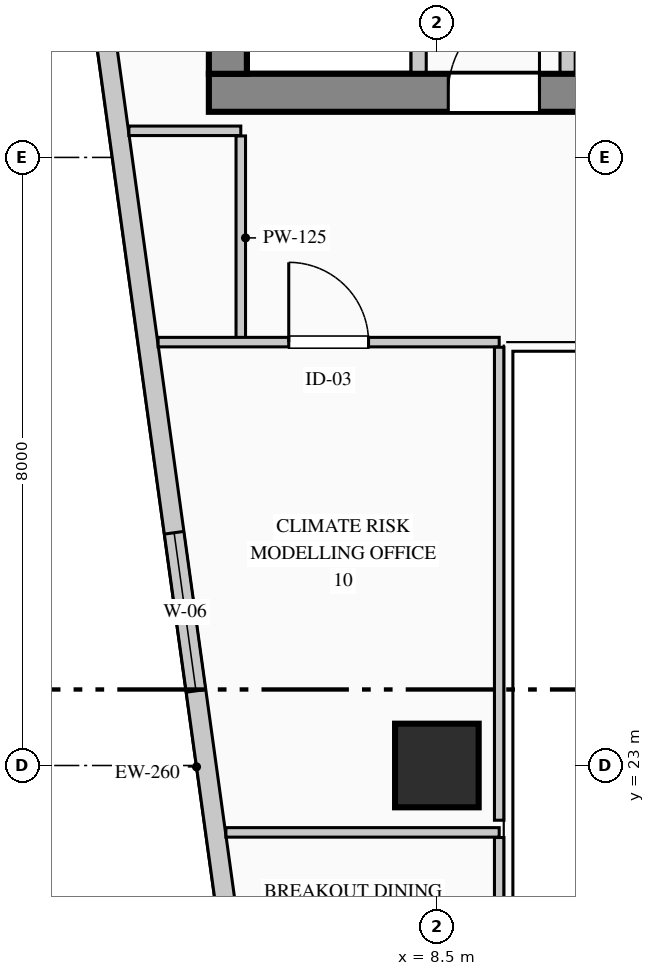
"""IFC4 building model, lengths in metres.
Left out: names, types, materials, properties, quantities, classifications, styles, units other than length and angle.
Written with IfcOpenShell. Run it as: python <this file> out.ifc"""

import sys

from ifc_helpers import new_model, si_unit, direction, frame, frame_2d, origin, origin_2d, place, context, subcontext, project, spatial, rectangle, extrude, element, fill, save


model = new_model("IFC4")
c1 = context("Model", 3, precision=1e-05, world=origin(), true_north=direction((0.0, 1.0)))
c2 = subcontext(c1, "Body", "Model", "MODEL_VIEW")
j1 = project(units=[si_unit("LENGTHUNIT", "METRE"), si_unit("PLANEANGLEUNIT", "RADIAN")], contexts=[c1])
p1 = place(None, origin())
s1 = spatial("IfcSite", under=j1, at=p1, CompositionType="ELEMENT")
p2 = place(p1, origin())
s2 = spatial("IfcBuilding", under=s1, at=p2, CompositionType="ELEMENT")
p3 = place(p2, frame((0.0, 0.0, 146.95)))
s3 = spatial("IfcBuildingStorey", under=s2, at=p3, CompositionType="ELEMENT", Elevation=146.95)
p4 = place(p3, frame((5.5, 31.85, 0.0), z_axis=(0.0, 0.0, 1.0), x_axis=(1.0, 0.0, 0.0)))
e1 = element("IfcWall", 1, at=p4, inside=s3, PredefinedType="SHEAR", context=c2, shape_type="SweptSolid", body=[
    extrude(rectangle(XDim=17.85, YDim=0.5, at=frame_2d((8.925, 0.0))), origin(), (0.0, 0.0, 1.0), 3.95),
])
p5 = place(p4, frame((3.15, 0.0, 0.0)))
e2 = element("IfcOpeningElement", 2, at=p5, cuts=e1, PredefinedType="OPENING", context=c2, shape_type="SweptSolid", body=[
    extrude(rectangle(XDim=1.2, YDim=2.2, at=frame_2d((0.6, 1.1))), frame((0.0, 0.26, 0.0), z_axis=(0.0, -1.0, 0.0), x_axis=(1.0, 0.0, 0.0)), (0.0, 0.0, 1.0), 0.52),
])
p6 = place(p4, frame((7.0, 0.0, 0.0)))
e3 = element("IfcOpeningElement", 3, at=p6, cuts=e1, PredefinedType="OPENING", context=c2, shape_type="SweptSolid", body=[
    extrude(rectangle(XDim=1.2, YDim=2.2, at=frame_2d((0.6, 1.1))), frame((0.0, 0.26, 0.0), z_axis=(0.0, -1.0, 0.0), x_axis=(1.0, 0.0, 0.0)), (0.0, 0.0, 1.0), 0.52),
])
p7 = place(p4, frame((8.85, 0.0, 0.0)))
e4 = element("IfcOpeningElement", 4, at=p7, cuts=e1, PredefinedType="OPENING", context=c2, shape_type="SweptSolid", body=[
    extrude(rectangle(XDim=1.15, YDim=2.2, at=frame_2d((0.575, 1.1))), frame((0.0, 0.26, 0.0), z_axis=(0.0, -1.0, 0.0), x_axis=(1.0, 0.0, 0.0)), (0.0, 0.0, 1.0), 0.52),
])
p8 = place(p4, frame((15.95, 0.0, 0.0)))
e5 = element("IfcOpeningElement", 5, at=p8, cuts=e1, PredefinedType="OPENING", context=c2, shape_type="SweptSolid", body=[
    extrude(rectangle(XDim=1.2, YDim=2.2, at=frame_2d((0.6, 1.1))), frame((0.0, 0.26, 0.0), z_axis=(0.0, -1.0, 0.0), x_axis=(1.0, 0.0, 0.0)), (0.0, 0.0, 1.0), 0.52),
])
p9 = place(p3, frame((5.75, 32.1, 0.0), z_axis=(0.0, 0.0, 1.0), x_axis=(0.0, 1.0, 0.0)))
e6 = element("IfcWall", 6, at=p9, inside=s3, PredefinedType="SHEAR", context=c2, shape_type="SweptSolid", body=[
    extrude(rectangle(XDim=8.3, YDim=0.5, at=frame_2d((4.15, 0.0))), origin(), (0.0, 0.0, 1.0), 3.95),
])
p10 = place(p3, frame((8.5, 23.0, 0.0), z_axis=(0.0, 0.0, 1.0), x_axis=(1.0, 0.0, 0.0)))
e7 = element("IfcColumn", 7, at=p10, inside=s3, PredefinedType="COLUMN", context=c2, shape_type="SweptSolid", body=[
    extrude(rectangle(XDim=1.1, YDim=1.1, at=origin_2d()), origin(), (0.0, 0.0, 1.0), 3.95),
])
p11 = place(p3, frame((7.993, 4.73, 0.0), z_axis=(0.0, 0.0, 1.0), x_axis=(-0.136989009016, 0.990572567462, 0.0)))
e8 = element("IfcWall", 8, at=p11, inside=s3, PredefinedType="STANDARD", context=c2, shape_type="SweptSolid", body=[
    extrude(rectangle(XDim=36.888, YDim=0.26, at=frame_2d((18.444, 0.0))), origin(), (0.0, 0.0, 1.0), 3.69),
])
p12 = place(p11, frame((19.435, 0.0, 0.9)))
e9 = element("IfcOpeningElement", 9, at=p12, cuts=e8, PredefinedType="OPENING", context=c2, shape_type="SweptSolid", body=[
    extrude(rectangle(XDim=2.1, YDim=2.0, at=frame_2d((1.05, 1.0))), frame((0.0, 0.14, 0.0), z_axis=(0.0, -1.0, 0.0), x_axis=(1.0, 0.0, 0.0)), (0.0, 0.0, 1.0), 0.28),
])
p13 = place(p3, frame((8.26, 32.12, 0.0), z_axis=(0.0, 0.0, 1.0), x_axis=(0.0, 1.0, 0.0)))
e10 = element("IfcWall", 10, at=p13, inside=s3, PredefinedType="PARTITIONING", context=c2, shape_type="SweptSolid", body=[
    extrude(rectangle(XDim=7.5, YDim=0.2, at=frame_2d((3.75, 0.0))), origin(), (0.0, 0.0, 1.0), 3.69),
])
p14 = place(p3, frame((10.22, 32.12, 0.0), z_axis=(0.0, 0.0, 1.0), x_axis=(0.0, 1.0, 0.0)))
e11 = element("IfcWall", 11, at=p14, inside=s3, PredefinedType="PARTITIONING", context=c2, shape_type="SweptSolid", body=[
    extrude(rectangle(XDim=8.26, YDim=0.2, at=frame_2d((4.13, 0.0))), origin(), (0.0, 0.0, 1.0), 3.69),
])
p15 = place(p3, frame((5.724, 22.12, 0.0), z_axis=(0.0, 0.0, 1.0), x_axis=(1.0, 0.0, 0.0)))
e12 = element("IfcWall", 12, at=p15, inside=s3, PredefinedType="PARTITIONING", context=c2, shape_type="SweptSolid", body=[
    extrude(rectangle(XDim=3.596, YDim=0.125, at=frame_2d((1.798, 0.0))), origin(), (0.0, 0.0, 1.0), 3.69),
])
p16 = place(p3, frame((9.32, 22.052, 0.0), z_axis=(0.0, 0.0, 1.0), x_axis=(0.0, -1.0, 0.0)))
e13 = element("IfcWall", 13, at=p16, inside=s3, PredefinedType="PARTITIONING", context=c2, shape_type="SweptSolid", body=[
    extrude(rectangle(XDim=2.302, YDim=0.125, at=frame_2d((1.151, 0.0))), origin(), (0.0, 0.0, 1.0), 3.315),
])
p17 = place(p3, frame((4.448, 31.35, 0.0), z_axis=(0.0, 0.0, 1.0), x_axis=(1.0, 0.0, 0.0)))
e14 = element("IfcWall", 14, at=p17, inside=s3, PredefinedType="PARTITIONING", context=c2, shape_type="SweptSolid", body=[
    extrude(rectangle(XDim=1.472, YDim=0.125, at=frame_2d((0.736, 0.0))), origin(), (0.0, 0.0, 1.0), 3.69),
])
p18 = place(p3, frame((5.92, 31.282, 0.0), z_axis=(0.0, 0.0, 1.0), x_axis=(0.0, -1.0, 0.0)))
e15 = element("IfcWall", 15, at=p18, inside=s3, PredefinedType="PARTITIONING", context=c2, shape_type="SweptSolid", body=[
    extrude(rectangle(XDim=2.682, YDim=0.125, at=frame_2d((1.341, 0.0))), origin(), (0.0, 0.0, 1.0), 3.69),
])
p19 = place(p3, frame((4.832, 28.57, 0.0), z_axis=(0.0, 0.0, 1.0), x_axis=(1.0, 0.0, 0.0)))
e16 = element("IfcWall", 16, at=p19, inside=s3, PredefinedType="PARTITIONING", context=c2, shape_type="SweptSolid", body=[
    extrude(rectangle(XDim=4.488, YDim=0.125, at=frame_2d((2.244, 0.0))), origin(), (0.0, 0.0, 1.0), 3.69),
])
p20 = place(p19, frame((1.719, 0.0, 0.0)))
e17 = element("IfcOpeningElement", 17, at=p20, cuts=e16, PredefinedType="OPENING", context=c2, shape_type="SweptSolid", body=[
    extrude(rectangle(XDim=1.05, YDim=2.15, at=frame_2d((0.525, 1.075))), frame((0.0, 0.073, 0.0), z_axis=(0.0, -1.0, 0.0), x_axis=(1.0, 0.0, 0.0)), (0.0, 0.0, 1.0), 0.145),
])
p21 = place(p3, frame((9.32, 28.502, 0.0), z_axis=(0.0, 0.0, 1.0), x_axis=(0.0, -1.0, 0.0)))
e18 = element("IfcWall", 18, at=p21, inside=s3, PredefinedType="PARTITIONING", context=c2, shape_type="SweptSolid", body=[
    extrude(rectangle(XDim=6.222, YDim=0.125, at=frame_2d((3.111, 0.0))), origin(), (0.0, 0.0, 1.0), 3.315),
])
p22 = place(p12, origin())
e19 = element("IfcWindow", 19, at=p22, inside=s3, PartitioningType="DOUBLE_PANEL_VERTICAL", PredefinedType="WINDOW", context=c2, shape_type="SweptSolid", body=[
    extrude(rectangle(XDim=2.1, YDim=2.0, at=frame_2d((1.05, 1.0))), frame((0.0, 0.03, 0.0), z_axis=(0.0, -1.0, 0.0), x_axis=(1.0, 0.0, 0.0)), (0.0, 0.0, 1.0), 0.06),
])
fill(e9, e19)
p23 = place(p5, origin())
e20 = element("IfcDoor", 20, at=p23, inside=s3, OperationType="SINGLE_SWING_RIGHT", PredefinedType="DOOR", context=c2, shape_type="SweptSolid", body=[
    extrude(rectangle(XDim=1.2, YDim=2.2, at=frame_2d((0.6, 1.1))), frame((0.0, 0.025, 0.0), z_axis=(0.0, -1.0, 0.0), x_axis=(1.0, 0.0, 0.0)), (0.0, 0.0, 1.0), 0.05),
])
fill(e2, e20)
p24 = place(p20, origin())
e21 = element("IfcDoor", 21, at=p24, inside=s3, OperationType="SINGLE_SWING_LEFT", PredefinedType="DOOR", context=c2, shape_type="SweptSolid", body=[
    extrude(rectangle(XDim=1.05, YDim=2.15, at=frame_2d((0.525, 1.075))), frame((0.0, 0.025, 0.0), z_axis=(0.0, -1.0, 0.0), x_axis=(1.0, 0.0, 0.0)), (0.0, 0.0, 1.0), 0.05),
])
fill(e17, e21)
save(model, sys.argv[1])
